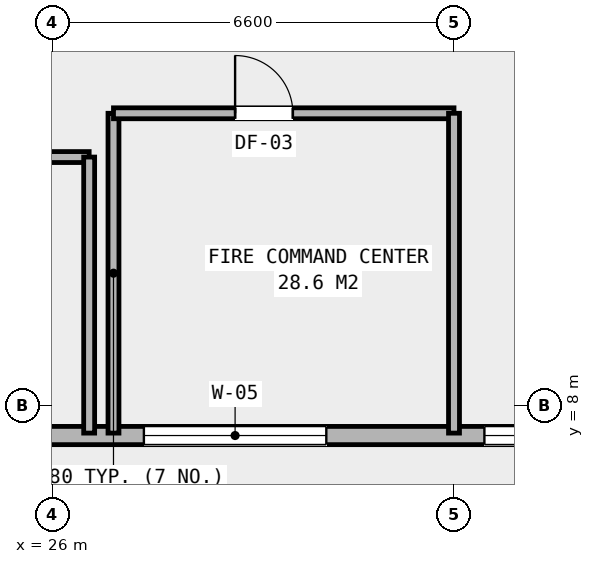
"""IFC4 building model, lengths in metres.
Left out: names, types, materials, properties, quantities, classifications, styles, units other than length and angle.
Written with IfcOpenShell. Run it as: python <this file> out.ifc"""

import sys

from ifc_helpers import new_model, si_unit, direction, frame, frame_2d, origin, place, context, subcontext, project, spatial, rectangle, extrude, element, fill, save


model = new_model("IFC4")
c1 = context("Model", 3, precision=1e-05, world=origin(), true_north=direction((0.0, 1.0)))
c2 = subcontext(c1, "Body", "Model", "MODEL_VIEW")
j1 = project(units=[si_unit("LENGTHUNIT", "METRE"), si_unit("PLANEANGLEUNIT", "RADIAN")], contexts=[c1])
p1 = place(None, origin())
s1 = spatial("IfcSite", under=j1, at=p1, CompositionType="ELEMENT")
p2 = place(p1, origin())
s2 = spatial("IfcBuilding", under=s1, at=p2, CompositionType="ELEMENT")
p3 = place(p2, origin())
s3 = spatial("IfcBuildingStorey", under=s2, at=p3, CompositionType="ELEMENT", Elevation=0.0)
p4 = place(p3, frame((15.5, 7.5, 0.0), z_axis=(0.0, 0.0, 1.0), x_axis=(1.0, 0.0, 0.0)))
e1 = element("IfcWall", 1, at=p4, inside=s3, PredefinedType="STANDARD", context=c2, shape_type="SweptSolid", body=[
    extrude(rectangle(XDim=49.0, YDim=0.3, at=frame_2d((24.5, 0.0))), origin(), (0.0, 0.0, 1.0), 5.22),
])
p5 = place(p4, frame((2.2, 0.0, 0.0)))
e2 = element("IfcOpeningElement", 2, at=p5, cuts=e1, PredefinedType="OPENING", context=c2, shape_type="SweptSolid", body=[
    extrude(rectangle(XDim=2.4, YDim=2.6, at=frame_2d((1.2, 1.3))), frame((0.0, 0.16, 0.0), z_axis=(0.0, -1.0, 0.0), x_axis=(1.0, 0.0, 0.0)), (0.0, 0.0, 1.0), 0.32),
])
p6 = place(p4, frame((22.0, 0.0, 0.0)))
e3 = element("IfcOpeningElement", 3, at=p6, cuts=e1, PredefinedType="OPENING", context=c2, shape_type="SweptSolid", body=[
    extrude(rectangle(XDim=2.4, YDim=2.6, at=frame_2d((1.2, 1.3))), frame((0.0, 0.16, 0.0), z_axis=(0.0, -1.0, 0.0), x_axis=(1.0, 0.0, 0.0)), (0.0, 0.0, 1.0), 0.32),
])
p7 = place(p4, frame((32.8, 0.0, 0.0)))
e4 = element("IfcOpeningElement", 4, at=p7, cuts=e1, PredefinedType="OPENING", context=c2, shape_type="SweptSolid", body=[
    extrude(rectangle(XDim=2.4, YDim=2.6, at=frame_2d((1.2, 1.3))), frame((0.0, 0.16, 0.0), z_axis=(0.0, -1.0, 0.0), x_axis=(1.0, 0.0, 0.0)), (0.0, 0.0, 1.0), 0.32),
])
p8 = place(p4, frame((7.9, 0.0, 0.0)))
e5 = element("IfcOpeningElement", 5, at=p8, cuts=e1, PredefinedType="OPENING", context=c2, shape_type="SweptSolid", body=[
    extrude(rectangle(XDim=1.2, YDim=2.2, at=frame_2d((0.6, 1.1))), frame((0.0, 0.16, 0.0), z_axis=(0.0, -1.0, 0.0), x_axis=(1.0, 0.0, 0.0)), (0.0, 0.0, 1.0), 0.32),
])
p9 = place(p4, frame((40.2, 0.0, 0.0)))
e6 = element("IfcOpeningElement", 6, at=p9, cuts=e1, PredefinedType="OPENING", context=c2, shape_type="SweptSolid", body=[
    extrude(rectangle(XDim=1.2, YDim=2.2, at=frame_2d((0.6, 1.1))), frame((0.0, 0.16, 0.0), z_axis=(0.0, -1.0, 0.0), x_axis=(1.0, 0.0, 0.0)), (0.0, 0.0, 1.0), 0.32),
])
p10 = place(p4, frame((12.0, 0.0, 3.2)))
e7 = element("IfcOpeningElement", 7, at=p10, cuts=e1, PredefinedType="OPENING", context=c2, shape_type="SweptSolid", body=[
    extrude(rectangle(XDim=3.0, YDim=1.2, at=frame_2d((1.5, 0.6))), frame((0.0, 0.16, 0.0), z_axis=(0.0, -1.0, 0.0), x_axis=(1.0, 0.0, 0.0)), (0.0, 0.0, 1.0), 0.32),
])
p11 = place(p4, frame((17.6, 0.0, 3.2)))
e8 = element("IfcOpeningElement", 8, at=p11, cuts=e1, PredefinedType="OPENING", context=c2, shape_type="SweptSolid", body=[
    extrude(rectangle(XDim=3.0, YDim=1.2, at=frame_2d((1.5, 0.6))), frame((0.0, 0.16, 0.0), z_axis=(0.0, -1.0, 0.0), x_axis=(1.0, 0.0, 0.0)), (0.0, 0.0, 1.0), 0.32),
])
p12 = place(p4, frame((27.6, 0.0, 3.2)))
e9 = element("IfcOpeningElement", 9, at=p12, cuts=e1, PredefinedType="OPENING", context=c2, shape_type="SweptSolid", body=[
    extrude(rectangle(XDim=3.0, YDim=1.2, at=frame_2d((1.5, 0.6))), frame((0.0, 0.16, 0.0), z_axis=(0.0, -1.0, 0.0), x_axis=(1.0, 0.0, 0.0)), (0.0, 0.0, 1.0), 0.32),
])
p13 = place(p4, frame((44.6, 0.0, 3.2)))
e10 = element("IfcOpeningElement", 10, at=p13, cuts=e1, PredefinedType="OPENING", context=c2, shape_type="SweptSolid", body=[
    extrude(rectangle(XDim=3.0, YDim=1.2, at=frame_2d((1.5, 0.6))), frame((0.0, 0.16, 0.0), z_axis=(0.0, -1.0, 0.0), x_axis=(1.0, 0.0, 0.0)), (0.0, 0.0, 1.0), 0.32),
])
p14 = place(p3, frame((21.445, 12.08, 0.0), z_axis=(0.0, 0.0, 1.0), x_axis=(1.0, 0.0, 0.0)))
e11 = element("IfcWall", 11, at=p14, inside=s3, PredefinedType="PARTITIONING", context=c2, shape_type="SweptSolid", body=[
    extrude(rectangle(XDim=5.155, YDim=0.18, at=frame_2d((2.578, 0.0))), origin(), (0.0, 0.0, 1.0), 4.671),
])
p15 = place(p3, frame((26.6, 7.54, 0.0), z_axis=(0.0, 0.0, 1.0), x_axis=(0.0, 1.0, 0.0)))
e12 = element("IfcWall", 12, at=p15, inside=s3, PredefinedType="PARTITIONING", context=c2, shape_type="SweptSolid", body=[
    extrude(rectangle(XDim=4.54, YDim=0.18, at=frame_2d((2.27, 0.0))), origin(), (0.0, 0.0, 1.0), 5.22),
])
p16 = place(p3, frame((27.0, 7.54, 0.0), z_axis=(0.0, 0.0, 1.0), x_axis=(0.0, 1.0, 0.0)))
e13 = element("IfcWall", 13, at=p16, inside=s3, PredefinedType="PARTITIONING", context=c2, shape_type="SweptSolid", body=[
    extrude(rectangle(XDim=5.26, YDim=0.18, at=frame_2d((2.63, 0.0))), origin(), (0.0, 0.0, 1.0), 4.671),
])
p17 = place(p3, frame((27.0, 12.8, 0.0), z_axis=(0.0, 0.0, 1.0), x_axis=(1.0, 0.0, 0.0)))
e14 = element("IfcWall", 14, at=p17, inside=s3, PredefinedType="PARTITIONING", context=c2, shape_type="SweptSolid", body=[
    extrude(rectangle(XDim=5.6, YDim=0.18, at=frame_2d((2.8, 0.0))), origin(), (0.0, 0.0, 1.0), 4.431),
])
p18 = place(p17, frame((2.0, 0.0, 0.0)))
e15 = element("IfcOpeningElement", 15, at=p18, cuts=e14, PredefinedType="OPENING", context=c2, shape_type="SweptSolid", body=[
    extrude(rectangle(XDim=0.95, YDim=2.1, at=frame_2d((0.475, 1.05))), frame((0.0, 0.1, 0.0), z_axis=(0.0, -1.0, 0.0), x_axis=(1.0, 0.0, 0.0)), (0.0, 0.0, 1.0), 0.2),
])
p19 = place(p3, frame((32.6, 7.54, 0.0), z_axis=(0.0, 0.0, 1.0), x_axis=(0.0, 1.0, 0.0)))
e16 = element("IfcWall", 16, at=p19, inside=s3, PredefinedType="PARTITIONING", context=c2, shape_type="SweptSolid", body=[
    extrude(rectangle(XDim=5.26, YDim=0.18, at=frame_2d((2.63, 0.0))), origin(), (0.0, 0.0, 1.0), 4.753),
])
p20 = place(p10, origin())
e17 = element("IfcWindow", 17, at=p20, inside=s3, PartitioningType="SINGLE_PANEL", PredefinedType="WINDOW", context=c2, shape_type="SweptSolid", body=[
    extrude(rectangle(XDim=3.0, YDim=1.2, at=frame_2d((1.5, 0.6))), frame((0.0, 0.03, 0.0), z_axis=(0.0, -1.0, 0.0), x_axis=(1.0, 0.0, 0.0)), (0.0, 0.0, 1.0), 0.06),
])
fill(e7, e17)
p21 = place(p11, origin())
e18 = element("IfcWindow", 18, at=p21, inside=s3, PartitioningType="SINGLE_PANEL", PredefinedType="WINDOW", context=c2, shape_type="SweptSolid", body=[
    extrude(rectangle(XDim=3.0, YDim=1.2, at=frame_2d((1.5, 0.6))), frame((0.0, 0.03, 0.0), z_axis=(0.0, -1.0, 0.0), x_axis=(1.0, 0.0, 0.0)), (0.0, 0.0, 1.0), 0.06),
])
fill(e8, e18)
p22 = place(p18, origin())
e19 = element("IfcDoor", 19, at=p22, inside=s3, OperationType="SINGLE_SWING_LEFT", PredefinedType="DOOR", context=c2, shape_type="SweptSolid", body=[
    extrude(rectangle(XDim=0.95, YDim=2.1, at=frame_2d((0.475, 1.05))), frame((0.0, 0.025, 0.0), z_axis=(0.0, -1.0, 0.0), x_axis=(1.0, 0.0, 0.0)), (0.0, 0.0, 1.0), 0.05),
])
fill(e15, e19)
save(model, sys.argv[1])
